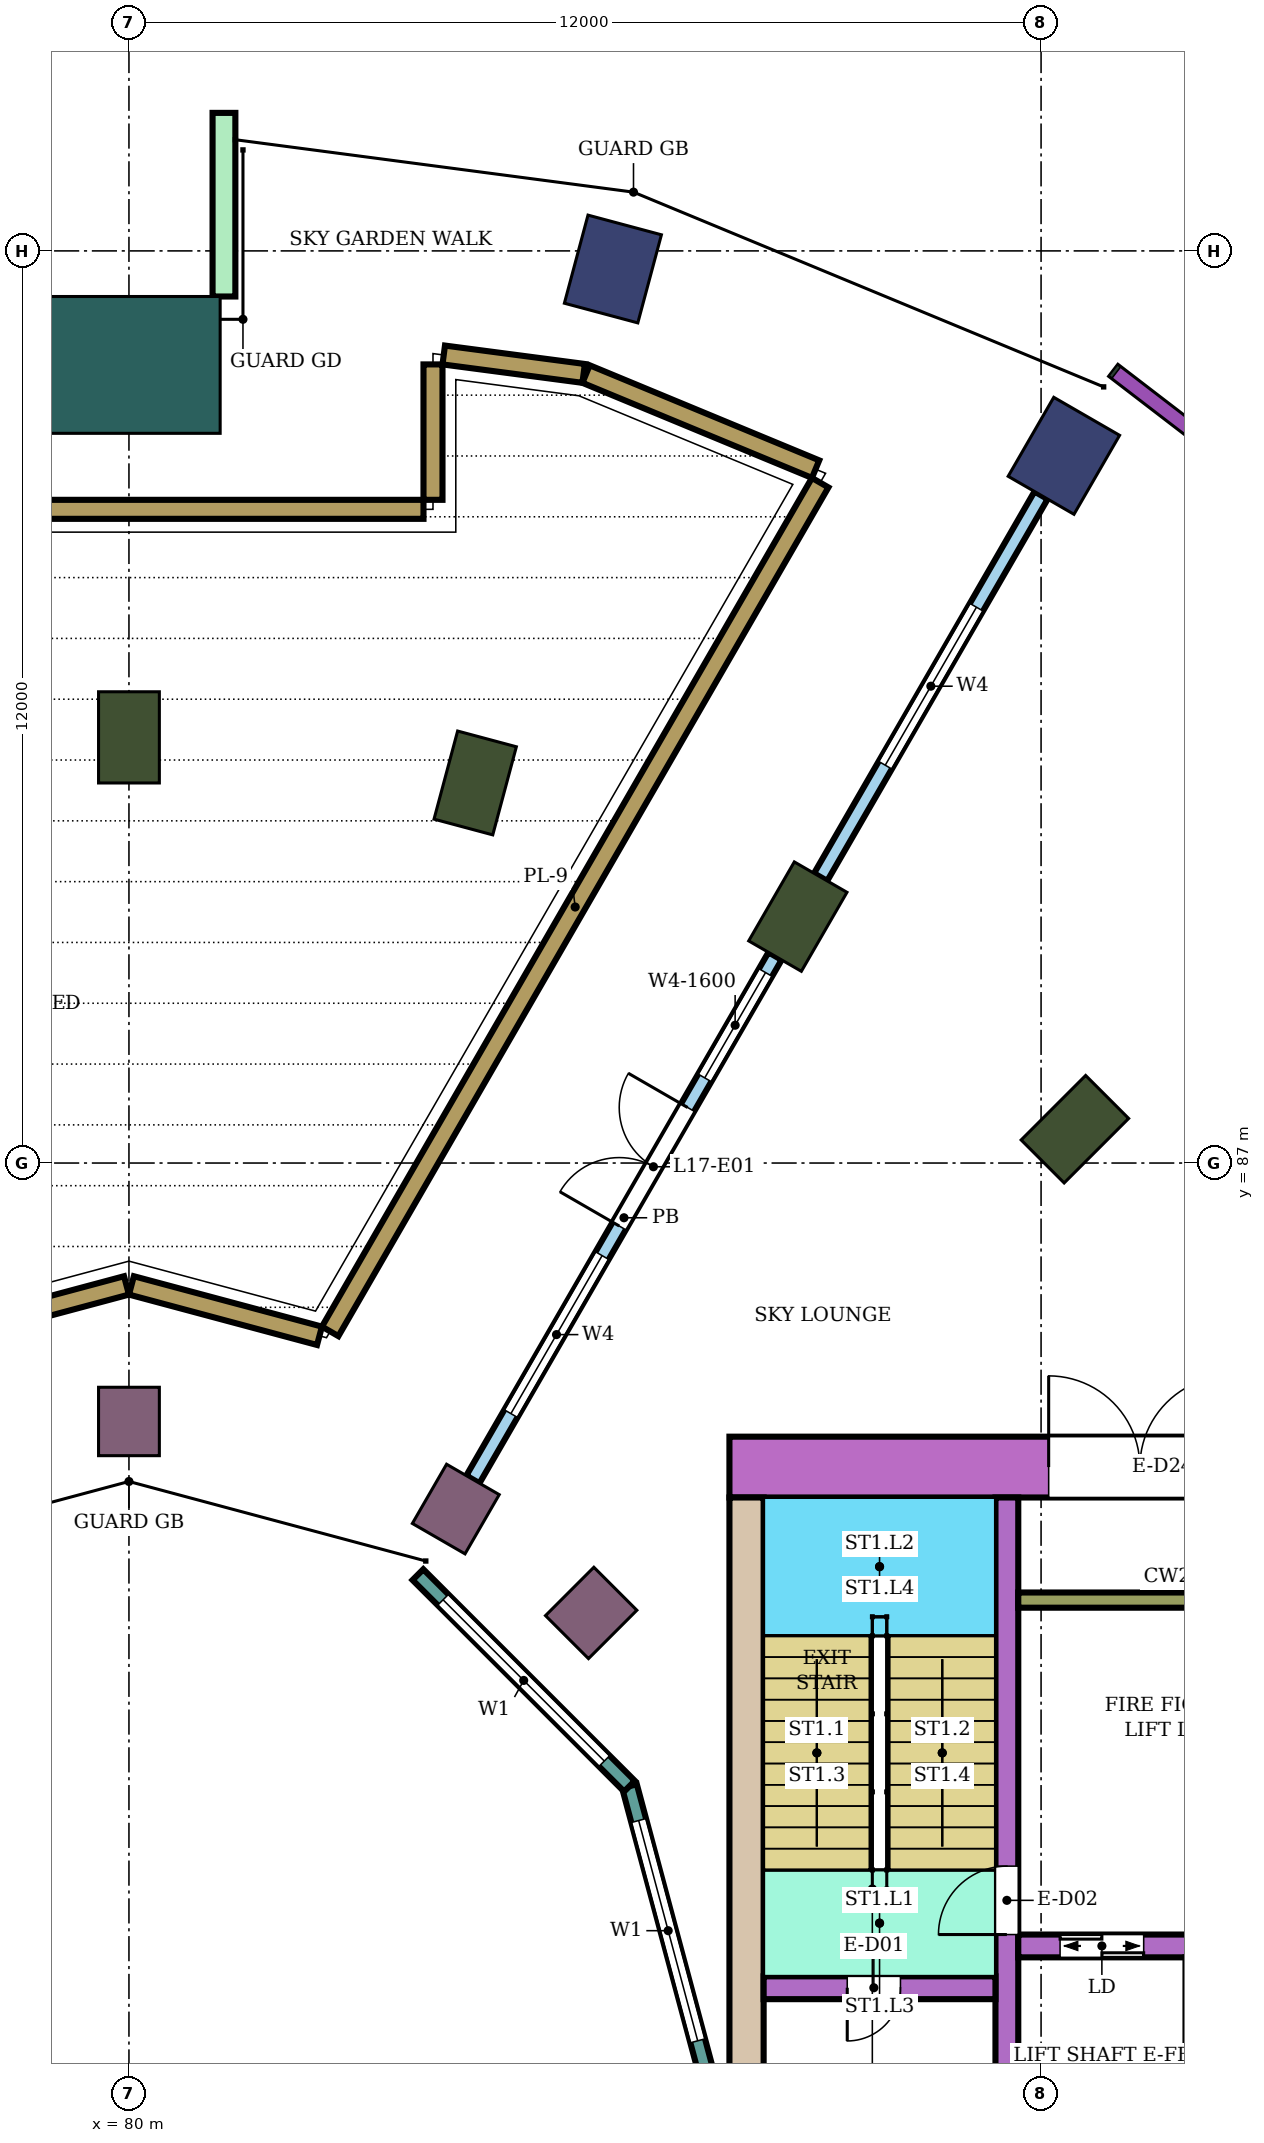
"""IFC4 building model, lengths in metres.
Left out: names, types, materials, properties, quantities, classifications, styles, units other than length and angle.
Written with IfcOpenShell. Run it as: python <this file> out.ifc"""

import sys

from ifc_helpers import new_model, si_unit, direction, frame, frame_2d, origin, origin_2d, place, context, subcontext, project, spatial, rectangle, extrude, element, fill, save


model = new_model("IFC4")
c1 = context("Model", 3, precision=1e-05, world=origin(), true_north=direction((0.0, 1.0)))
c2 = subcontext(c1, "Body", "Model", "MODEL_VIEW")
j1 = project(units=[si_unit("LENGTHUNIT", "METRE"), si_unit("PLANEANGLEUNIT", "RADIAN")], contexts=[c1])
p1 = place(None, origin())
s1 = spatial("IfcSite", under=j1, at=p1, CompositionType="ELEMENT")
p2 = place(p1, origin())
s2 = spatial("IfcBuilding", under=s1, at=p2, CompositionType="ELEMENT")
p3 = place(p2, frame((0.0, 0.0, 74.4)))
s3 = spatial("IfcBuildingStorey", under=s2, at=p3, CompositionType="ELEMENT", Elevation=74.4)
for number, where, z_axis, x_axis in (
    (1, (92.3, 96.304, 0.0), (0.0, 0.0, 1.0), (0.5, 0.866, 0.0)),
    (2, (86.367, 98.762, 0.0), (0.0, 0.0, 1.0), (0.259, 0.966, 0.0)),
):
    element("IfcColumn", number, at=place(p3, frame(where, z_axis=z_axis, x_axis=x_axis)), inside=s3, PredefinedType="COLUMN", context=c2, shape_type="SweptSolid", body=[
        extrude(rectangle(XDim=1.2, YDim=1.0, at=origin_2d()), origin(), (0.0, 0.0, 1.0), 8.0),
    ])
for number, where, z_axis, x_axis in (
    (3, (92.445, 87.445, 0.0), (0.0, 0.0, 1.0), (0.707, 0.707, 0.0)),
    (4, (88.8, 90.242, 0.0), (0.0, 0.0, 1.0), (0.5, 0.866, 0.0)),
    (5, (84.555, 92.0, 0.0), (0.0, 0.0, 1.0), (0.259, 0.966, 0.0)),
    (6, (80.0, 92.6, 0.0), (0.0, 0.0, 1.0), (0.0, 1.0, 0.0)),
):
    element("IfcColumn", number, at=place(p3, frame(where, z_axis=z_axis, x_axis=x_axis)), inside=s3, PredefinedType="COLUMN", context=c2, shape_type="SweptSolid", body=[
        extrude(rectangle(XDim=1.2, YDim=0.8, at=origin_2d()), origin(), (0.0, 0.0, 1.0), 8.0),
    ])
for number, where, z_axis, x_axis in (
    (7, (86.081, 81.081, 0.0), (0.0, 0.0, 1.0), (0.707, 0.707, 0.0)),
    (8, (84.3, 82.448, 0.0), (0.0, 0.0, 1.0), (0.5, 0.866, 0.0)),
    (9, (80.0, 83.6, 0.0), (0.0, 0.0, 1.0), (0.0, 1.0, 0.0)),
):
    element("IfcColumn", number, at=place(p3, frame(where, z_axis=z_axis, x_axis=x_axis)), inside=s3, PredefinedType="COLUMN", context=c2, shape_type="SweptSolid", body=[
        extrude(rectangle(XDim=0.9, YDim=0.8, at=origin_2d()), origin(), (0.0, 0.0, 1.0), 8.0),
    ])
p4 = place(p3, frame((80.0, 97.5, 0.0), z_axis=(0.0, 0.0, 1.0), x_axis=(0.0, 1.0, 0.0)))
e10 = element("IfcColumn", 10, at=p4, inside=s3, PredefinedType="COLUMN", context=c2, shape_type="SweptSolid", body=[
    extrude(rectangle(XDim=1.8, YDim=2.4, at=origin_2d()), origin(), (0.0, 0.0, 1.0), 8.0),
])
p5 = place(p3, frame((87.9, 83.0, 0.0), z_axis=(0.0, 0.0, 1.0), x_axis=(1.0, 0.0, 0.0)))
e11 = element("IfcWall", 11, at=p5, inside=s3, PredefinedType="SHEAR", context=c2, shape_type="SweptSolid", body=[
    extrude(rectangle(XDim=14.7, YDim=0.8, at=frame_2d((7.35, 0.0))), origin(), (0.0, 0.0, 1.0), 7.68),
])
p6 = place(p5, frame((4.2, 0.0, 0.0)))
e12 = element("IfcOpeningElement", 12, at=p6, cuts=e11, PredefinedType="OPENING", context=c2, shape_type="SweptSolid", body=[
    extrude(rectangle(XDim=2.4, YDim=2.4, at=frame_2d((1.2, 1.2))), frame((0.0, 0.41, 0.0), z_axis=(0.0, -1.0, 0.0), x_axis=(1.0, 0.0, 0.0)), (0.0, 0.0, 1.0), 0.82),
])
p7 = place(p3, frame((88.125, 75.0, 0.0), z_axis=(0.0, 0.0, 1.0), x_axis=(0.0, 1.0, 0.0)))
e13 = element("IfcWall", 13, at=p7, inside=s3, PredefinedType="SHEAR", context=c2, shape_type="SweptSolid", body=[
    extrude(rectangle(XDim=7.6, YDim=0.45, at=frame_2d((3.8, 0.0))), origin(), (0.0, 0.0, 1.0), 7.68),
])
p8 = place(p3, frame((91.55, 75.0, 0.0), z_axis=(0.0, 0.0, 1.0), x_axis=(0.0, 1.0, 0.0)))
e14 = element("IfcWall", 14, at=p8, inside=s3, PredefinedType="SHEAR", context=c2, shape_type="SweptSolid", body=[
    extrude(rectangle(XDim=7.6, YDim=0.3, at=frame_2d((3.8, 0.0))), origin(), (0.0, 0.0, 1.0), 7.68),
])
p9 = place(p8, frame((1.85, 0.0, 0.0)))
e15 = element("IfcOpeningElement", 15, at=p9, cuts=e14, PredefinedType="OPENING", context=c2, shape_type="SweptSolid", body=[
    extrude(rectangle(XDim=0.9, YDim=2.1, at=frame_2d((0.45, 1.05))), frame((0.0, 0.16, 0.0), z_axis=(0.0, -1.0, 0.0), x_axis=(1.0, 0.0, 0.0)), (0.0, 0.0, 1.0), 0.32),
])
p10 = place(p3, frame((88.35, 76.15, 0.0), z_axis=(0.0, 0.0, 1.0), x_axis=(1.0, 0.0, 0.0)))
e16 = element("IfcWall", 16, at=p10, inside=s3, PredefinedType="SHEAR", context=c2, shape_type="SweptSolid", body=[
    extrude(rectangle(XDim=3.05, YDim=0.3, at=frame_2d((1.525, 0.0))), origin(), (0.0, 0.0, 1.0), 7.68),
])
p11 = place(p10, frame((1.1, 0.0, 0.0)))
e17 = element("IfcOpeningElement", 17, at=p11, cuts=e16, PredefinedType="OPENING", context=c2, shape_type="SweptSolid", body=[
    extrude(rectangle(XDim=0.7, YDim=2.0, at=frame_2d((0.35, 1.0))), frame((0.0, 0.16, 0.0), z_axis=(0.0, -1.0, 0.0), x_axis=(1.0, 0.0, 0.0)), (0.0, 0.0, 1.0), 0.32),
])
p12 = place(p3, frame((91.7, 76.7, 0.0), z_axis=(0.0, 0.0, 1.0), x_axis=(1.0, 0.0, 0.0)))
e18 = element("IfcWall", 18, at=p12, inside=s3, PredefinedType="SHEAR", context=c2, shape_type="SweptSolid", body=[
    extrude(rectangle(XDim=10.9, YDim=0.3, at=frame_2d((5.45, 0.0))), origin(), (0.0, 0.0, 1.0), 7.68),
])
p13 = place(p12, frame((0.55, 0.0, 0.0)))
e19 = element("IfcOpeningElement", 19, at=p13, cuts=e18, PredefinedType="OPENING", context=c2, shape_type="SweptSolid", body=[
    extrude(rectangle(XDim=1.1, YDim=2.1, at=frame_2d((0.55, 1.05))), frame((0.0, 0.16, 0.0), z_axis=(0.0, -1.0, 0.0), x_axis=(1.0, 0.0, 0.0)), (0.0, 0.0, 1.0), 0.32),
])
p14 = place(p12, frame((8.1, 0.0, 0.0)))
e20 = element("IfcOpeningElement", 20, at=p14, cuts=e18, PredefinedType="OPENING", context=c2, shape_type="SweptSolid", body=[
    extrude(rectangle(XDim=1.0, YDim=2.1, at=frame_2d((0.5, 1.05))), frame((0.0, 0.16, 0.0), z_axis=(0.0, -1.0, 0.0), x_axis=(1.0, 0.0, 0.0)), (0.0, 0.0, 1.0), 0.32),
])
p15 = place(p3, frame((91.7, 81.25, 0.0), z_axis=(0.0, 0.0, 1.0), x_axis=(1.0, 0.0, 0.0)))
e21 = element("IfcWall", 21, at=p15, inside=s3, PredefinedType="SHEAR", context=c2, shape_type="SweptSolid", body=[
    extrude(rectangle(XDim=4.65, YDim=0.2, at=frame_2d((2.325, 0.0))), origin(), (0.0, 0.0, 1.0), 7.68),
])
p16 = place(p3, frame((81.25, 98.4, 0.0), z_axis=(0.0, 0.0, 1.0), x_axis=(0.0, 1.0, 0.0)))
e22 = element("IfcWall", 22, at=p16, inside=s3, PredefinedType="NOTDEFINED", context=c2, shape_type="SweptSolid", body=[
    extrude(rectangle(XDim=2.416, YDim=0.3, at=frame_2d((1.208, 0.0))), origin(), (0.0, 0.0, 1.0), 8.0),
])
p17 = place(p3, frame((87.604, 75.0, 0.0), z_axis=(0.0, 0.0, 1.0), x_axis=(-0.258789828301, 0.965933654434, 0.0)))
e23 = element("IfcWall", 23, at=p17, inside=s3, PredefinedType="NOTDEFINED", context=c2, shape_type="SweptSolid", body=[
    extrude(rectangle(XDim=3.936, YDim=0.2, at=frame_2d((1.968, 0.0))), origin(), (0.0, 0.0, 1.0), 8.0),
])
p18 = place(p17, frame((0.468, 0.0, 0.9)))
e24 = element("IfcOpeningElement", 24, at=p18, cuts=e23, PredefinedType="OPENING", context=c2, shape_type="SweptSolid", body=[
    extrude(rectangle(XDim=3.0, YDim=2.3, at=frame_2d((1.5, 1.15))), frame((0.0, 0.11, 0.0), z_axis=(0.0, -1.0, 0.0), x_axis=(1.0, 0.0, 0.0)), (0.0, 0.0, 1.0), 0.22),
])
p19 = place(p3, frame((86.585, 78.802, 0.0), z_axis=(0.0, 0.0, 1.0), x_axis=(-0.707106781187, 0.707106781187, 0.0)))
e25 = element("IfcWall", 25, at=p19, inside=s3, PredefinedType="NOTDEFINED", context=c2, shape_type="SweptSolid", body=[
    extrude(rectangle(XDim=3.936, YDim=0.2, at=frame_2d((1.968, 0.0))), origin(), (0.0, 0.0, 1.0), 8.0),
])
p20 = place(p19, frame((0.468, 0.0, 0.9)))
e26 = element("IfcOpeningElement", 26, at=p20, cuts=e25, PredefinedType="OPENING", context=c2, shape_type="SweptSolid", body=[
    extrude(rectangle(XDim=3.0, YDim=2.3, at=frame_2d((1.5, 1.15))), frame((0.0, 0.11, 0.0), z_axis=(0.0, -1.0, 0.0), x_axis=(1.0, 0.0, 0.0)), (0.0, 0.0, 1.0), 0.22),
])
for number, where, z_axis, x_axis in (
    (27, (77.493, 84.727, 0.0), (0.0, 0.0, 1.0), (0.966, 0.259, 0.0)),
    (28, (80.032, 85.39, 0.0), (0.0, 0.0, 1.0), (0.966, -0.259, 0.0)),
):
    element("IfcWall", number, at=place(p3, frame(where, z_axis=z_axis, x_axis=x_axis)), inside=s3, PredefinedType="USERDEFINED", context=c2, shape_type="SweptSolid", body=[
        extrude(rectangle(XDim=2.562, YDim=0.25, at=frame_2d((1.281, 0.0))), origin(), (0.0, 0.0, 1.0), 0.6),
    ])
p21 = place(p3, frame((82.647, 84.785, 0.0), z_axis=(0.0, 0.0, 1.0), x_axis=(0.499992370413, 0.866029808684, 0.0)))
e29 = element("IfcWall", 29, at=p21, inside=s3, PredefinedType="USERDEFINED", context=c2, shape_type="SweptSolid", body=[
    extrude(rectangle(XDim=12.893, YDim=0.25, at=frame_2d((6.446, 0.0))), origin(), (0.0, 0.0, 1.0), 0.6),
])
p22 = place(p3, frame((89.033, 96.129, 0.0), z_axis=(0.0, 0.0, 1.0), x_axis=(-0.923863886655, 0.382721202621, 0.0)))
e30 = element("IfcWall", 30, at=p22, inside=s3, PredefinedType="USERDEFINED", context=c2, shape_type="SweptSolid", body=[
    extrude(rectangle(XDim=3.269, YDim=0.25, at=frame_2d((1.634, 0.0))), origin(), (0.0, 0.0, 1.0), 0.6),
])
p23 = place(p3, frame((85.982, 97.388, 0.0), z_axis=(0.0, 0.0, 1.0), x_axis=(-0.991436829887, 0.130587182926, 0.0)))
e31 = element("IfcWall", 31, at=p23, inside=s3, PredefinedType="USERDEFINED", context=c2, shape_type="SweptSolid", body=[
    extrude(rectangle(XDim=1.856, YDim=0.25, at=frame_2d((0.928, 0.0))), origin(), (0.0, 0.0, 1.0), 0.6),
])
p24 = place(p3, frame((84.0, 97.507, 0.0), z_axis=(0.0, 0.0, 1.0), x_axis=(0.0, -1.0, 0.0)))
e32 = element("IfcWall", 32, at=p24, inside=s3, PredefinedType="USERDEFINED", context=c2, shape_type="SweptSolid", body=[
    extrude(rectangle(XDim=1.781, YDim=0.25, at=frame_2d((0.891, 0.0))), origin(), (0.0, 0.0, 1.0), 0.6),
])
p25 = place(p3, frame((83.875, 95.6, 0.0), z_axis=(0.0, 0.0, 1.0), x_axis=(-1.0, 0.0, 0.0)))
e33 = element("IfcWall", 33, at=p25, inside=s3, PredefinedType="USERDEFINED", context=c2, shape_type="SweptSolid", body=[
    extrude(rectangle(XDim=7.75, YDim=0.25, at=frame_2d((3.875, 0.0))), origin(), (0.0, 0.0, 1.0), 0.6),
])
p26 = place(p3, frame((84.525, 82.838, 0.0), z_axis=(0.0, 0.0, 1.0), x_axis=(0.50001663867, 0.86601579723, 0.0)))
e34 = element("IfcWall", 34, at=p26, inside=s3, PredefinedType="NOTDEFINED", context=c2, shape_type="SweptSolid", body=[
    extrude(rectangle(XDim=7.95, YDim=0.2, at=frame_2d((3.975, 0.0))), origin(), (0.0, 0.0, 1.0), 8.0),
])
p27 = place(p26, frame((1.0, 0.0, 0.3)))
e35 = element("IfcOpeningElement", 35, at=p27, cuts=e34, PredefinedType="OPENING", context=c2, shape_type="SweptSolid", body=[
    extrude(rectangle(XDim=2.4, YDim=3.6, at=frame_2d((1.2, 1.8))), frame((0.0, 0.11, 0.0), z_axis=(0.0, -1.0, 0.0), x_axis=(1.0, 0.0, 0.0)), (0.0, 0.0, 1.0), 0.22),
])
p28 = place(p26, frame((3.85, 0.0, 0.0)))
e36 = element("IfcOpeningElement", 36, at=p28, cuts=e34, PredefinedType="OPENING", context=c2, shape_type="SweptSolid", body=[
    extrude(rectangle(XDim=1.8, YDim=2.4, at=frame_2d((0.9, 1.2))), frame((0.0, 0.11, 0.0), z_axis=(0.0, -1.0, 0.0), x_axis=(1.0, 0.0, 0.0)), (0.0, 0.0, 1.0), 0.22),
])
p29 = place(p26, frame((6.1, 0.0, 0.3)))
e37 = element("IfcOpeningElement", 37, at=p29, cuts=e34, PredefinedType="OPENING", context=c2, shape_type="SweptSolid", body=[
    extrude(rectangle(XDim=1.6, YDim=3.6, at=frame_2d((0.8, 1.8))), frame((0.0, 0.11, 0.0), z_axis=(0.0, -1.0, 0.0), x_axis=(1.0, 0.0, 0.0)), (0.0, 0.0, 1.0), 0.22),
])
p30 = place(p3, frame((89.1, 90.762, 0.0), z_axis=(0.0, 0.0, 1.0), x_axis=(0.499987231761, 0.866032775405, 0.0)))
e38 = element("IfcWall", 38, at=p30, inside=s3, PredefinedType="NOTDEFINED", context=c2, shape_type="SweptSolid", body=[
    extrude(rectangle(XDim=5.8, YDim=0.2, at=frame_2d((2.9, 0.0))), origin(), (0.0, 0.0, 1.0), 8.0),
])
p31 = place(p30, frame((1.7, 0.0, 0.3)))
e39 = element("IfcOpeningElement", 39, at=p31, cuts=e38, PredefinedType="OPENING", context=c2, shape_type="SweptSolid", body=[
    extrude(rectangle(XDim=2.4, YDim=3.6, at=frame_2d((1.2, 1.8))), frame((0.0, 0.11, 0.0), z_axis=(0.0, -1.0, 0.0), x_axis=(1.0, 0.0, 0.0)), (0.0, 0.0, 1.0), 0.22),
])
p32 = place(p18, origin())
e40 = element("IfcWindow", 40, at=p32, inside=s3, PartitioningType="SINGLE_PANEL", PredefinedType="WINDOW", context=c2, shape_type="SweptSolid", body=[
    extrude(rectangle(XDim=3.0, YDim=2.3, at=frame_2d((1.5, 1.15))), frame((0.0, 0.03, 0.0), z_axis=(0.0, -1.0, 0.0), x_axis=(1.0, 0.0, 0.0)), (0.0, 0.0, 1.0), 0.06),
])
fill(e24, e40)
p33 = place(p20, origin())
e41 = element("IfcWindow", 41, at=p33, inside=s3, PartitioningType="SINGLE_PANEL", PredefinedType="WINDOW", context=c2, shape_type="SweptSolid", body=[
    extrude(rectangle(XDim=3.0, YDim=2.3, at=frame_2d((1.5, 1.15))), frame((0.0, 0.03, 0.0), z_axis=(0.0, -1.0, 0.0), x_axis=(1.0, 0.0, 0.0)), (0.0, 0.0, 1.0), 0.06),
])
fill(e26, e41)
p34 = place(p27, origin())
e42 = element("IfcWindow", 42, at=p34, inside=s3, PartitioningType="SINGLE_PANEL", PredefinedType="WINDOW", context=c2, shape_type="SweptSolid", body=[
    extrude(rectangle(XDim=2.4, YDim=3.6, at=frame_2d((1.2, 1.8))), frame((0.0, 0.03, 0.0), z_axis=(0.0, -1.0, 0.0), x_axis=(1.0, 0.0, 0.0)), (0.0, 0.0, 1.0), 0.06),
])
fill(e35, e42)
p35 = place(p28, origin())
e43 = element("IfcDoor", 43, at=p35, inside=s3, OperationType="DOUBLE_DOOR_SINGLE_SWING", PredefinedType="DOOR", context=c2, shape_type="SweptSolid", body=[
    extrude(rectangle(XDim=1.8, YDim=2.4, at=frame_2d((0.9, 1.2))), frame((0.0, 0.025, 0.0), z_axis=(0.0, -1.0, 0.0), x_axis=(1.0, 0.0, 0.0)), (0.0, 0.0, 1.0), 0.05),
])
fill(e36, e43)
p36 = place(p29, origin())
e44 = element("IfcWindow", 44, at=p36, inside=s3, PartitioningType="SINGLE_PANEL", PredefinedType="WINDOW", context=c2, shape_type="SweptSolid", body=[
    extrude(rectangle(XDim=1.6, YDim=3.6, at=frame_2d((0.8, 1.8))), frame((0.0, 0.03, 0.0), z_axis=(0.0, -1.0, 0.0), x_axis=(1.0, 0.0, 0.0)), (0.0, 0.0, 1.0), 0.06),
])
fill(e37, e44)
p37 = place(p31, origin())
e45 = element("IfcWindow", 45, at=p37, inside=s3, PartitioningType="SINGLE_PANEL", PredefinedType="WINDOW", context=c2, shape_type="SweptSolid", body=[
    extrude(rectangle(XDim=2.4, YDim=3.6, at=frame_2d((1.2, 1.8))), frame((0.0, 0.03, 0.0), z_axis=(0.0, -1.0, 0.0), x_axis=(1.0, 0.0, 0.0)), (0.0, 0.0, 1.0), 0.06),
])
fill(e39, e45)
p38 = place(p11, frame((0.7, 0.0, 0.0), z_axis=(0.0, 0.0, 1.0), x_axis=(-1.0, 0.0, 0.0)))
e46 = element("IfcDoor", 46, at=p38, inside=s3, OperationType="SINGLE_SWING_RIGHT", PredefinedType="DOOR", context=c2, shape_type="SweptSolid", body=[
    extrude(rectangle(XDim=0.7, YDim=2.0, at=frame_2d((0.35, 1.0))), frame((0.0, 0.025, 0.0), z_axis=(0.0, -1.0, 0.0), x_axis=(1.0, 0.0, 0.0)), (0.0, 0.0, 1.0), 0.05),
])
fill(e17, e46)
p39 = place(p9, origin())
e47 = element("IfcDoor", 47, at=p39, inside=s3, OperationType="SINGLE_SWING_LEFT", PredefinedType="DOOR", context=c2, shape_type="SweptSolid", body=[
    extrude(rectangle(XDim=0.9, YDim=2.1, at=frame_2d((0.45, 1.05))), frame((0.0, 0.025, 0.0), z_axis=(0.0, -1.0, 0.0), x_axis=(1.0, 0.0, 0.0)), (0.0, 0.0, 1.0), 0.05),
])
fill(e15, e47)
p40 = place(p13, origin())
e48 = element("IfcDoor", 48, at=p40, inside=s3, OperationType="DOUBLE_DOOR_SLIDING", PredefinedType="DOOR", context=c2, shape_type="SweptSolid", body=[
    extrude(rectangle(XDim=1.1, YDim=2.1, at=frame_2d((0.55, 1.05))), frame((0.0, 0.025, 0.0), z_axis=(0.0, -1.0, 0.0), x_axis=(1.0, 0.0, 0.0)), (0.0, 0.0, 1.0), 0.05),
])
fill(e19, e48)
p41 = place(p6, origin())
e49 = element("IfcDoor", 49, at=p41, inside=s3, OperationType="DOUBLE_DOOR_SINGLE_SWING", PredefinedType="DOOR", context=c2, shape_type="SweptSolid", body=[
    extrude(rectangle(XDim=2.4, YDim=2.4, at=frame_2d((1.2, 1.2))), frame((0.0, 0.025, 0.0), z_axis=(0.0, -1.0, 0.0), x_axis=(1.0, 0.0, 0.0)), (0.0, 0.0, 1.0), 0.05),
])
fill(e12, e49)
save(model, sys.argv[1])
